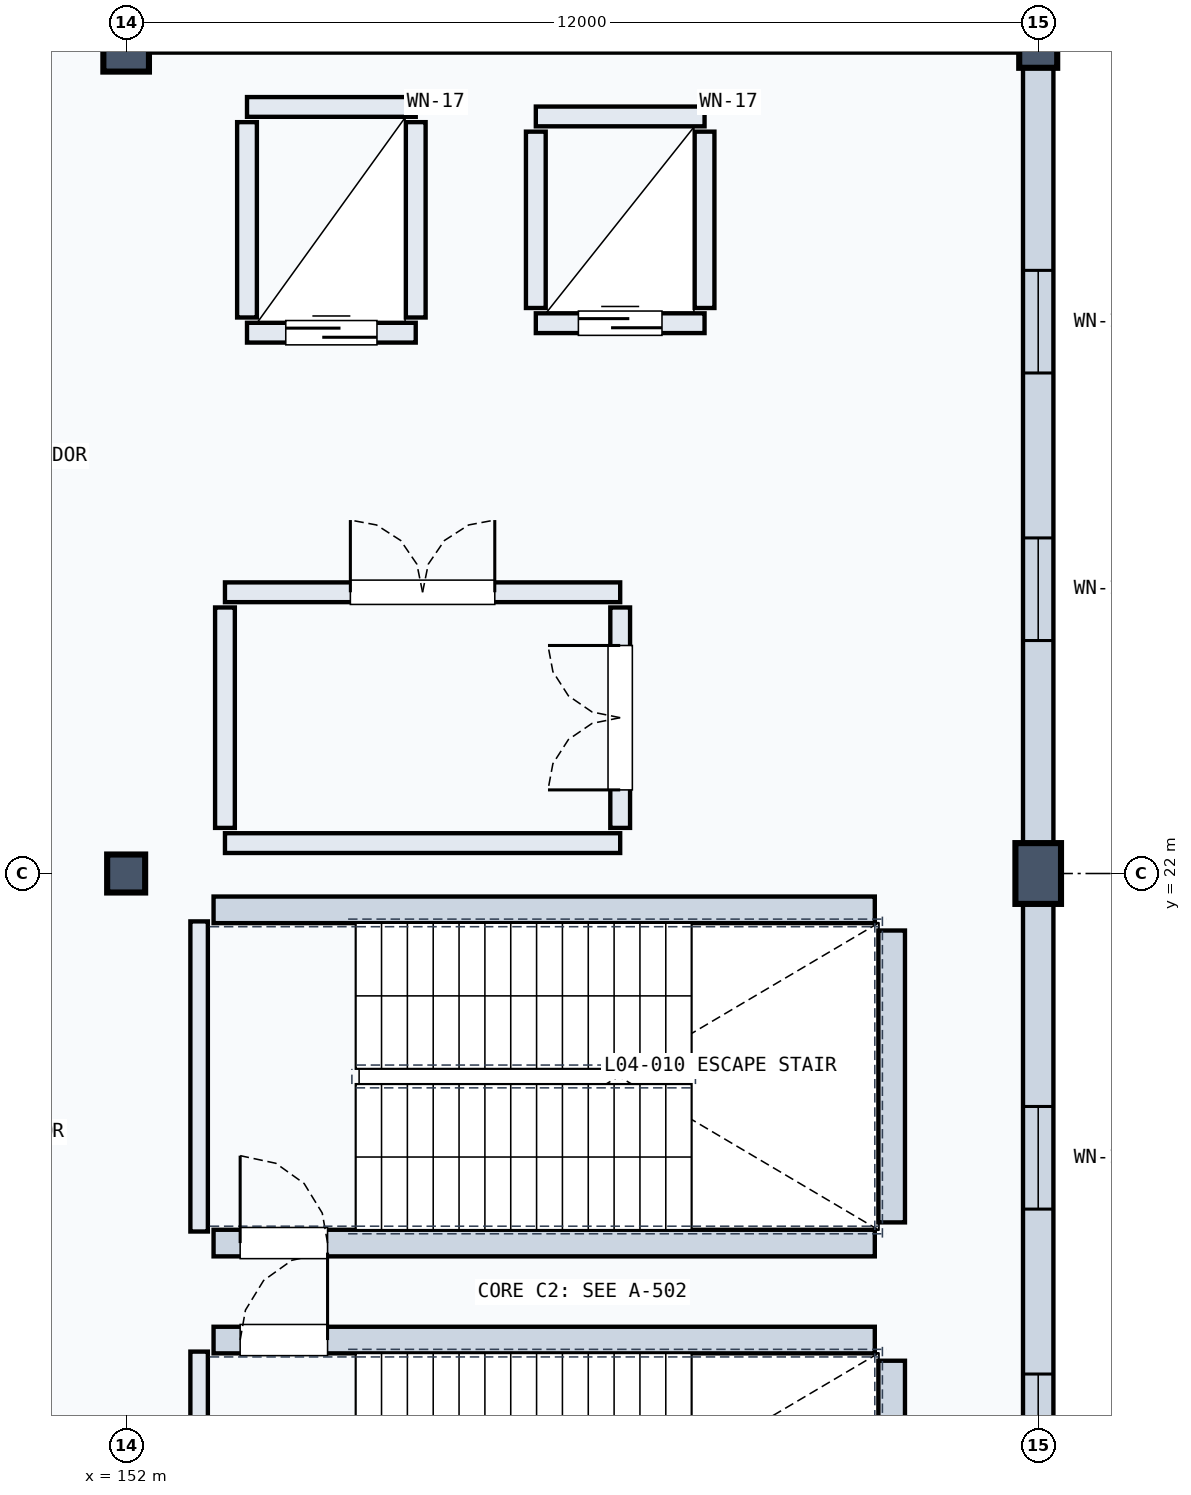
"""IFC4 building model, lengths in metres.
Left out: names, types, materials, properties, quantities, classifications, styles, units other than length and angle.
Written with IfcOpenShell. Run it as: python <this file> out.ifc"""

import sys

from ifc_helpers import new_model, si_unit, direction, frame, frame_2d, origin, origin_2d, place, context, subcontext, project, spatial, rectangle, extrude, element, fill, save


model = new_model("IFC4")
c1 = context("Model", 3, precision=1e-05, world=origin(), true_north=direction((0.0, 1.0)))
c2 = subcontext(c1, "Body", "Model", "MODEL_VIEW")
j1 = project(units=[si_unit("LENGTHUNIT", "METRE"), si_unit("PLANEANGLEUNIT", "RADIAN")], contexts=[c1])
p1 = place(None, origin())
s1 = spatial("IfcSite", under=j1, at=p1, CompositionType="ELEMENT")
p2 = place(p1, origin())
s2 = spatial("IfcBuilding", under=s1, at=p2, CompositionType="ELEMENT")
p3 = place(p2, frame((0.0, 0.0, 19.5)))
s3 = spatial("IfcBuildingStorey", under=s2, at=p3, CompositionType="ELEMENT", Elevation=19.5)
p4 = place(p3, frame((152.0, 22.0, 0.0), z_axis=(0.0, 0.0, 1.0), x_axis=(1.0, 0.0, 0.0)))
e1 = element("IfcColumn", 1, at=p4, inside=s3, PredefinedType="COLUMN", context=c2, shape_type="SweptSolid", body=[
    extrude(rectangle(XDim=0.5, YDim=0.5, at=origin_2d()), origin(), (0.0, 0.0, 1.0), 4.8),
])
p5 = place(p3, frame((152.0, 33.0, 0.0), z_axis=(0.0, 0.0, 1.0), x_axis=(1.0, 0.0, 0.0)))
e2 = element("IfcColumn", 2, at=p5, inside=s3, PredefinedType="COLUMN", context=c2, shape_type="SweptSolid", body=[
    extrude(rectangle(XDim=0.6, YDim=0.9, at=origin_2d()), origin(), (0.0, 0.0, 1.0), 4.8),
])
p6 = place(p3, frame((164.0, 22.0, 0.0), z_axis=(0.0, 0.0, 1.0), x_axis=(1.0, 0.0, 0.0)))
e3 = element("IfcColumn", 3, at=p6, inside=s3, PredefinedType="COLUMN", context=c2, shape_type="SweptSolid", body=[
    extrude(rectangle(XDim=0.6, YDim=0.8, at=origin_2d()), origin(), (0.0, 0.0, 1.0), 4.8),
])
p7 = place(p3, frame((164.0, 33.0, 0.0), z_axis=(0.0, 0.0, 1.0), x_axis=(1.0, 0.0, 0.0)))
e4 = element("IfcColumn", 4, at=p7, inside=s3, PredefinedType="COLUMN", context=c2, shape_type="SweptSolid", body=[
    extrude(rectangle(XDim=0.5, YDim=0.8, at=origin_2d()), origin(), (0.0, 0.0, 1.0), 4.8),
])
p8 = place(p3, frame((164.0, 11.22, 0.0), z_axis=(0.0, 0.0, 1.0), x_axis=(0.0, 1.0, 0.0)))
e5 = element("IfcWall", 5, at=p8, inside=s3, PredefinedType="SOLIDWALL", context=c2, shape_type="SweptSolid", body=[
    extrude(rectangle(XDim=10.56, YDim=0.4, at=frame_2d((5.28, 0.0))), origin(), (0.0, 0.0, 1.0), 3.79),
])
p9 = place(p8, frame((2.845, 0.0, 0.8)))
e6 = element("IfcOpeningElement", 6, at=p9, cuts=e5, PredefinedType="OPENING", context=c2, shape_type="SweptSolid", body=[
    extrude(rectangle(XDim=1.35, YDim=2.1, at=frame_2d((0.675, 1.05))), frame((0.0, 0.21, 0.0), z_axis=(0.0, -1.0, 0.0), x_axis=(1.0, 0.0, 0.0)), (0.0, 0.0, 1.0), 0.42),
])
p10 = place(p8, frame((6.365, 0.0, 0.8)))
e7 = element("IfcOpeningElement", 7, at=p10, cuts=e5, PredefinedType="OPENING", context=c2, shape_type="SweptSolid", body=[
    extrude(rectangle(XDim=1.35, YDim=2.1, at=frame_2d((0.675, 1.05))), frame((0.0, 0.21, 0.0), z_axis=(0.0, -1.0, 0.0), x_axis=(1.0, 0.0, 0.0)), (0.0, 0.0, 1.0), 0.42),
])
p11 = place(p3, frame((152.22, 33.0, 0.0), z_axis=(0.0, 0.0, 1.0), x_axis=(1.0, 0.0, 0.0)))
e8 = element("IfcWall", 8, at=p11, inside=s3, PredefinedType="SOLIDWALL", context=c2, shape_type="SweptSolid", body=[
    extrude(rectangle(XDim=11.56, YDim=0.4, at=frame_2d((5.78, 0.0))), origin(), (0.0, 0.0, 1.0), 3.79),
])
p12 = place(p11, frame((3.178, 0.0, 0.8)))
e9 = element("IfcOpeningElement", 9, at=p12, cuts=e8, PredefinedType="OPENING", context=c2, shape_type="SweptSolid", body=[
    extrude(rectangle(XDim=1.35, YDim=2.1, at=frame_2d((0.675, 1.05))), frame((0.0, 0.21, 0.0), z_axis=(0.0, -1.0, 0.0), x_axis=(1.0, 0.0, 0.0)), (0.0, 0.0, 1.0), 0.42),
])
p13 = place(p11, frame((7.032, 0.0, 0.8)))
e10 = element("IfcOpeningElement", 10, at=p13, cuts=e8, PredefinedType="OPENING", context=c2, shape_type="SweptSolid", body=[
    extrude(rectangle(XDim=1.35, YDim=2.1, at=frame_2d((0.675, 1.05))), frame((0.0, 0.21, 0.0), z_axis=(0.0, -1.0, 0.0), x_axis=(1.0, 0.0, 0.0)), (0.0, 0.0, 1.0), 0.42),
])
p14 = place(p3, frame((164.0, 22.22, 0.0), z_axis=(0.0, 0.0, 1.0), x_axis=(0.0, 1.0, 0.0)))
e11 = element("IfcWall", 11, at=p14, inside=s3, PredefinedType="SOLIDWALL", context=c2, shape_type="SweptSolid", body=[
    extrude(rectangle(XDim=10.56, YDim=0.4, at=frame_2d((5.28, 0.0))), origin(), (0.0, 0.0, 1.0), 3.79),
])
p15 = place(p14, frame((2.845, 0.0, 0.8)))
e12 = element("IfcOpeningElement", 12, at=p15, cuts=e11, PredefinedType="OPENING", context=c2, shape_type="SweptSolid", body=[
    extrude(rectangle(XDim=1.35, YDim=2.1, at=frame_2d((0.675, 1.05))), frame((0.0, 0.21, 0.0), z_axis=(0.0, -1.0, 0.0), x_axis=(1.0, 0.0, 0.0)), (0.0, 0.0, 1.0), 0.42),
])
p16 = place(p14, frame((6.365, 0.0, 0.8)))
e13 = element("IfcOpeningElement", 13, at=p16, cuts=e11, PredefinedType="OPENING", context=c2, shape_type="SweptSolid", body=[
    extrude(rectangle(XDim=1.35, YDim=2.1, at=frame_2d((0.675, 1.05))), frame((0.0, 0.21, 0.0), z_axis=(0.0, -1.0, 0.0), x_axis=(1.0, 0.0, 0.0)), (0.0, 0.0, 1.0), 0.42),
])
p17 = place(p3, frame((152.96, 11.63, 0.0), z_axis=(0.0, 0.0, 1.0), x_axis=(0.0, 1.0, 0.0)))
e14 = element("IfcWall", 14, at=p17, inside=s3, PredefinedType="SOLIDWALL", context=c2, shape_type="SweptSolid", body=[
    extrude(rectangle(XDim=4.08, YDim=0.23, at=frame_2d((2.04, 0.0))), origin(), (0.0, 0.0, 1.0), 4.46),
])
p18 = place(p3, frame((162.072, 11.05, 0.0), z_axis=(0.0, 0.0, 1.0), x_axis=(0.0, 1.0, 0.0)))
e15 = element("IfcWall", 15, at=p18, inside=s3, PredefinedType="SOLIDWALL", context=c2, shape_type="SweptSolid", body=[
    extrude(rectangle(XDim=4.54, YDim=0.35, at=frame_2d((2.27, 0.0))), origin(), (0.0, 0.0, 1.0), 4.46),
])
p19 = place(p3, frame((153.15, 15.862, 0.0), z_axis=(0.0, 0.0, 1.0), x_axis=(1.0, 0.0, 0.0)))
e16 = element("IfcWall", 16, at=p19, inside=s3, PredefinedType="SOLIDWALL", context=c2, shape_type="SweptSolid", body=[
    extrude(rectangle(XDim=8.7, YDim=0.35, at=frame_2d((4.35, 0.0))), origin(), (0.0, 0.0, 1.0), 4.46),
])
p20 = place(p19, frame((0.35, 0.0, 0.0)))
e17 = element("IfcOpeningElement", 17, at=p20, cuts=e16, PredefinedType="OPENING", context=c2, shape_type="SweptSolid", body=[
    extrude(rectangle(XDim=1.15, YDim=2.2, at=frame_2d((0.575, 1.1))), frame((0.0, 0.185, 0.0), z_axis=(0.0, -1.0, 0.0), x_axis=(1.0, 0.0, 0.0)), (0.0, 0.0, 1.0), 0.37),
])
p21 = place(p3, frame((152.96, 17.29, 0.0), z_axis=(0.0, 0.0, 1.0), x_axis=(0.0, 1.0, 0.0)))
e18 = element("IfcWall", 18, at=p21, inside=s3, PredefinedType="SOLIDWALL", context=c2, shape_type="SweptSolid", body=[
    extrude(rectangle(XDim=4.08, YDim=0.23, at=frame_2d((2.04, 0.0))), origin(), (0.0, 0.0, 1.0), 4.46),
])
p22 = place(p3, frame((162.072, 17.41, 0.0), z_axis=(0.0, 0.0, 1.0), x_axis=(0.0, 1.0, 0.0)))
e19 = element("IfcWall", 19, at=p22, inside=s3, PredefinedType="SOLIDWALL", context=c2, shape_type="SweptSolid", body=[
    extrude(rectangle(XDim=3.84, YDim=0.35, at=frame_2d((1.92, 0.0))), origin(), (0.0, 0.0, 1.0), 4.46),
])
p23 = place(p3, frame((153.15, 17.138, 0.0), z_axis=(0.0, 0.0, 1.0), x_axis=(1.0, 0.0, 0.0)))
e20 = element("IfcWall", 20, at=p23, inside=s3, PredefinedType="SOLIDWALL", context=c2, shape_type="SweptSolid", body=[
    extrude(rectangle(XDim=8.7, YDim=0.35, at=frame_2d((4.35, 0.0))), origin(), (0.0, 0.0, 1.0), 4.46),
])
p24 = place(p23, frame((0.35, 0.0, 0.0)))
e21 = element("IfcOpeningElement", 21, at=p24, cuts=e20, PredefinedType="OPENING", context=c2, shape_type="SweptSolid", body=[
    extrude(rectangle(XDim=1.15, YDim=2.2, at=frame_2d((0.575, 1.1))), frame((0.0, 0.185, 0.0), z_axis=(0.0, -1.0, 0.0), x_axis=(1.0, 0.0, 0.0)), (0.0, 0.0, 1.0), 0.37),
])
p25 = place(p3, frame((153.15, 21.522, 0.0), z_axis=(0.0, 0.0, 1.0), x_axis=(1.0, 0.0, 0.0)))
e22 = element("IfcWall", 22, at=p25, inside=s3, PredefinedType="SOLIDWALL", context=c2, shape_type="SweptSolid", body=[
    extrude(rectangle(XDim=8.7, YDim=0.35, at=frame_2d((4.35, 0.0))), origin(), (0.0, 0.0, 1.0), 4.46),
])
p26 = place(p3, frame((153.59, 29.115, 0.0), z_axis=(0.0, 0.0, 1.0), x_axis=(1.0, 0.0, 0.0)))
e23 = element("IfcWall", 23, at=p26, inside=s3, PredefinedType="SOLIDWALL", context=c2, shape_type="SweptSolid", body=[
    extrude(rectangle(XDim=2.22, YDim=0.26, at=frame_2d((1.11, 0.0))), origin(), (0.0, 0.0, 1.0), 4.46),
])
p27 = place(p26, frame((0.51, 0.0, 0.0)))
e24 = element("IfcOpeningElement", 24, at=p27, cuts=e23, PredefinedType="OPENING", context=c2, shape_type="SweptSolid", body=[
    extrude(rectangle(XDim=1.2, YDim=2.2, at=frame_2d((0.6, 1.1))), frame((0.0, 0.14, 0.0), z_axis=(0.0, -1.0, 0.0), x_axis=(1.0, 0.0, 0.0)), (0.0, 0.0, 1.0), 0.28),
])
p28 = place(p3, frame((153.59, 32.085, 0.0), z_axis=(0.0, 0.0, 1.0), x_axis=(1.0, 0.0, 0.0)))
e25 = element("IfcWall", 25, at=p28, inside=s3, PredefinedType="SOLIDWALL", context=c2, shape_type="SweptSolid", body=[
    extrude(rectangle(XDim=2.22, YDim=0.26, at=frame_2d((1.11, 0.0))), origin(), (0.0, 0.0, 1.0), 4.46),
])
for number, where, z_axis, x_axis in (
    (26, (153.59, 29.315, 0.0), (0.0, 0.0, 1.0), (0.0, 1.0, 0.0)),
    (27, (155.81, 29.315, 0.0), (0.0, 0.0, 1.0), (0.0, 1.0, 0.0)),
):
    element("IfcWall", number, at=place(p3, frame(where, z_axis=z_axis, x_axis=x_axis)), inside=s3, PredefinedType="SOLIDWALL", context=c2, shape_type="SweptSolid", body=[
        extrude(rectangle(XDim=2.57, YDim=0.26, at=frame_2d((1.285, 0.0))), origin(), (0.0, 0.0, 1.0), 4.46),
    ])
p29 = place(p3, frame((157.39, 29.24, 0.0), z_axis=(0.0, 0.0, 1.0), x_axis=(1.0, 0.0, 0.0)))
e28 = element("IfcWall", 28, at=p29, inside=s3, PredefinedType="SOLIDWALL", context=c2, shape_type="SweptSolid", body=[
    extrude(rectangle(XDim=2.22, YDim=0.26, at=frame_2d((1.11, 0.0))), origin(), (0.0, 0.0, 1.0), 4.46),
])
p30 = place(p29, frame((0.56, 0.0, 0.0)))
e29 = element("IfcOpeningElement", 29, at=p30, cuts=e28, PredefinedType="OPENING", context=c2, shape_type="SweptSolid", body=[
    extrude(rectangle(XDim=1.1, YDim=2.15, at=frame_2d((0.55, 1.075))), frame((0.0, 0.14, 0.0), z_axis=(0.0, -1.0, 0.0), x_axis=(1.0, 0.0, 0.0)), (0.0, 0.0, 1.0), 0.28),
])
p31 = place(p3, frame((157.39, 31.96, 0.0), z_axis=(0.0, 0.0, 1.0), x_axis=(1.0, 0.0, 0.0)))
e30 = element("IfcWall", 30, at=p31, inside=s3, PredefinedType="SOLIDWALL", context=c2, shape_type="SweptSolid", body=[
    extrude(rectangle(XDim=2.22, YDim=0.26, at=frame_2d((1.11, 0.0))), origin(), (0.0, 0.0, 1.0), 4.46),
])
for number, where, z_axis, x_axis in (
    (31, (157.39, 29.44, 0.0), (0.0, 0.0, 1.0), (0.0, 1.0, 0.0)),
    (32, (159.61, 29.44, 0.0), (0.0, 0.0, 1.0), (0.0, 1.0, 0.0)),
):
    element("IfcWall", number, at=place(p3, frame(where, z_axis=z_axis, x_axis=x_axis)), inside=s3, PredefinedType="SOLIDWALL", context=c2, shape_type="SweptSolid", body=[
        extrude(rectangle(XDim=2.32, YDim=0.26, at=frame_2d((1.16, 0.0))), origin(), (0.0, 0.0, 1.0), 4.46),
    ])
p32 = place(p3, frame((153.3, 25.7, 0.0), z_axis=(0.0, 0.0, 1.0), x_axis=(1.0, 0.0, 0.0)))
e33 = element("IfcWall", 33, at=p32, inside=s3, PredefinedType="SOLIDWALL", context=c2, shape_type="SweptSolid", body=[
    extrude(rectangle(XDim=5.2, YDim=0.26, at=frame_2d((2.6, 0.0))), origin(), (0.0, 0.0, 1.0), 4.46),
])
p33 = place(p32, frame((1.65, 0.0, 0.0)))
e34 = element("IfcOpeningElement", 34, at=p33, cuts=e33, PredefinedType="OPENING", context=c2, shape_type="SweptSolid", body=[
    extrude(rectangle(XDim=1.9, YDim=2.2, at=frame_2d((0.95, 1.1))), frame((0.0, 0.14, 0.0), z_axis=(0.0, -1.0, 0.0), x_axis=(1.0, 0.0, 0.0)), (0.0, 0.0, 1.0), 0.28),
])
p34 = place(p3, frame((153.3, 22.4, 0.0), z_axis=(0.0, 0.0, 1.0), x_axis=(1.0, 0.0, 0.0)))
e35 = element("IfcWall", 35, at=p34, inside=s3, PredefinedType="SOLIDWALL", context=c2, shape_type="SweptSolid", body=[
    extrude(rectangle(XDim=5.2, YDim=0.26, at=frame_2d((2.6, 0.0))), origin(), (0.0, 0.0, 1.0), 3.89),
])
p35 = place(p3, frame((153.3, 22.6, 0.0), z_axis=(0.0, 0.0, 1.0), x_axis=(0.0, 1.0, 0.0)))
e36 = element("IfcWall", 36, at=p35, inside=s3, PredefinedType="SOLIDWALL", context=c2, shape_type="SweptSolid", body=[
    extrude(rectangle(XDim=2.9, YDim=0.26, at=frame_2d((1.45, 0.0))), origin(), (0.0, 0.0, 1.0), 4.46),
])
p36 = place(p3, frame((158.5, 22.6, 0.0), z_axis=(0.0, 0.0, 1.0), x_axis=(0.0, 1.0, 0.0)))
e37 = element("IfcWall", 37, at=p36, inside=s3, PredefinedType="SOLIDWALL", context=c2, shape_type="SweptSolid", body=[
    extrude(rectangle(XDim=2.9, YDim=0.26, at=frame_2d((1.45, 0.0))), origin(), (0.0, 0.0, 1.0), 4.46),
])
p37 = place(p36, frame((0.5, 0.0, 0.0)))
e38 = element("IfcOpeningElement", 38, at=p37, cuts=e37, PredefinedType="OPENING", context=c2, shape_type="SweptSolid", body=[
    extrude(rectangle(XDim=1.9, YDim=2.2, at=frame_2d((0.95, 1.1))), frame((0.0, 0.14, 0.0), z_axis=(0.0, -1.0, 0.0), x_axis=(1.0, 0.0, 0.0)), (0.0, 0.0, 1.0), 0.28),
])
p38 = place(p9, origin())
e39 = element("IfcWindow", 39, at=p38, inside=s3, PartitioningType="SINGLE_PANEL", PredefinedType="WINDOW", context=c2, shape_type="SweptSolid", body=[
    extrude(rectangle(XDim=1.35, YDim=2.1, at=frame_2d((0.675, 1.05))), frame((0.0, 0.03, 0.0), z_axis=(0.0, -1.0, 0.0), x_axis=(1.0, 0.0, 0.0)), (0.0, 0.0, 1.0), 0.06),
])
fill(e6, e39)
p39 = place(p10, origin())
e40 = element("IfcWindow", 40, at=p39, inside=s3, PartitioningType="SINGLE_PANEL", PredefinedType="WINDOW", context=c2, shape_type="SweptSolid", body=[
    extrude(rectangle(XDim=1.35, YDim=2.1, at=frame_2d((0.675, 1.05))), frame((0.0, 0.03, 0.0), z_axis=(0.0, -1.0, 0.0), x_axis=(1.0, 0.0, 0.0)), (0.0, 0.0, 1.0), 0.06),
])
fill(e7, e40)
p40 = place(p15, origin())
e41 = element("IfcWindow", 41, at=p40, inside=s3, PartitioningType="SINGLE_PANEL", PredefinedType="WINDOW", context=c2, shape_type="SweptSolid", body=[
    extrude(rectangle(XDim=1.35, YDim=2.1, at=frame_2d((0.675, 1.05))), frame((0.0, 0.03, 0.0), z_axis=(0.0, -1.0, 0.0), x_axis=(1.0, 0.0, 0.0)), (0.0, 0.0, 1.0), 0.06),
])
fill(e12, e41)
p41 = place(p16, origin())
e42 = element("IfcWindow", 42, at=p41, inside=s3, PartitioningType="SINGLE_PANEL", PredefinedType="WINDOW", context=c2, shape_type="SweptSolid", body=[
    extrude(rectangle(XDim=1.35, YDim=2.1, at=frame_2d((0.675, 1.05))), frame((0.0, 0.03, 0.0), z_axis=(0.0, -1.0, 0.0), x_axis=(1.0, 0.0, 0.0)), (0.0, 0.0, 1.0), 0.06),
])
fill(e13, e42)
p42 = place(p20, origin())
e43 = element("IfcDoor", 43, at=p42, inside=s3, OperationType="SINGLE_SWING_RIGHT", PredefinedType="DOOR", context=c2, shape_type="SweptSolid", body=[
    extrude(rectangle(XDim=1.15, YDim=2.2, at=frame_2d((0.575, 1.1))), frame((0.0, 0.025, 0.0), z_axis=(0.0, -1.0, 0.0), x_axis=(1.0, 0.0, 0.0)), (0.0, 0.0, 1.0), 0.05),
])
fill(e17, e43)
p43 = place(p24, origin())
e44 = element("IfcDoor", 44, at=p43, inside=s3, OperationType="SINGLE_SWING_LEFT", PredefinedType="DOOR", context=c2, shape_type="SweptSolid", body=[
    extrude(rectangle(XDim=1.15, YDim=2.2, at=frame_2d((0.575, 1.1))), frame((0.0, 0.025, 0.0), z_axis=(0.0, -1.0, 0.0), x_axis=(1.0, 0.0, 0.0)), (0.0, 0.0, 1.0), 0.05),
])
fill(e21, e44)
p44 = place(p27, origin())
e45 = element("IfcDoor", 45, at=p44, inside=s3, OperationType="SLIDING_TO_LEFT", PredefinedType="DOOR", context=c2, shape_type="SweptSolid", body=[
    extrude(rectangle(XDim=1.2, YDim=2.2, at=frame_2d((0.6, 1.1))), frame((0.0, 0.025, 0.0), z_axis=(0.0, -1.0, 0.0), x_axis=(1.0, 0.0, 0.0)), (0.0, 0.0, 1.0), 0.05),
])
fill(e24, e45)
p45 = place(p30, origin())
e46 = element("IfcDoor", 46, at=p45, inside=s3, OperationType="SLIDING_TO_LEFT", PredefinedType="DOOR", context=c2, shape_type="SweptSolid", body=[
    extrude(rectangle(XDim=1.1, YDim=2.15, at=frame_2d((0.55, 1.075))), frame((0.0, 0.025, 0.0), z_axis=(0.0, -1.0, 0.0), x_axis=(1.0, 0.0, 0.0)), (0.0, 0.0, 1.0), 0.05),
])
fill(e29, e46)
p46 = place(p33, origin())
e47 = element("IfcDoor", 47, at=p46, inside=s3, OperationType="DOUBLE_DOOR_SINGLE_SWING", PredefinedType="DOOR", context=c2, shape_type="SweptSolid", body=[
    extrude(rectangle(XDim=1.9, YDim=2.2, at=frame_2d((0.95, 1.1))), frame((0.0, 0.025, 0.0), z_axis=(0.0, -1.0, 0.0), x_axis=(1.0, 0.0, 0.0)), (0.0, 0.0, 1.0), 0.05),
])
fill(e34, e47)
p47 = place(p37, origin())
e48 = element("IfcDoor", 48, at=p47, inside=s3, OperationType="DOUBLE_DOOR_SINGLE_SWING", PredefinedType="DOOR", context=c2, shape_type="SweptSolid", body=[
    extrude(rectangle(XDim=1.9, YDim=2.2, at=frame_2d((0.95, 1.1))), frame((0.0, 0.025, 0.0), z_axis=(0.0, -1.0, 0.0), x_axis=(1.0, 0.0, 0.0)), (0.0, 0.0, 1.0), 0.05),
])
fill(e38, e48)
save(model, sys.argv[1])
